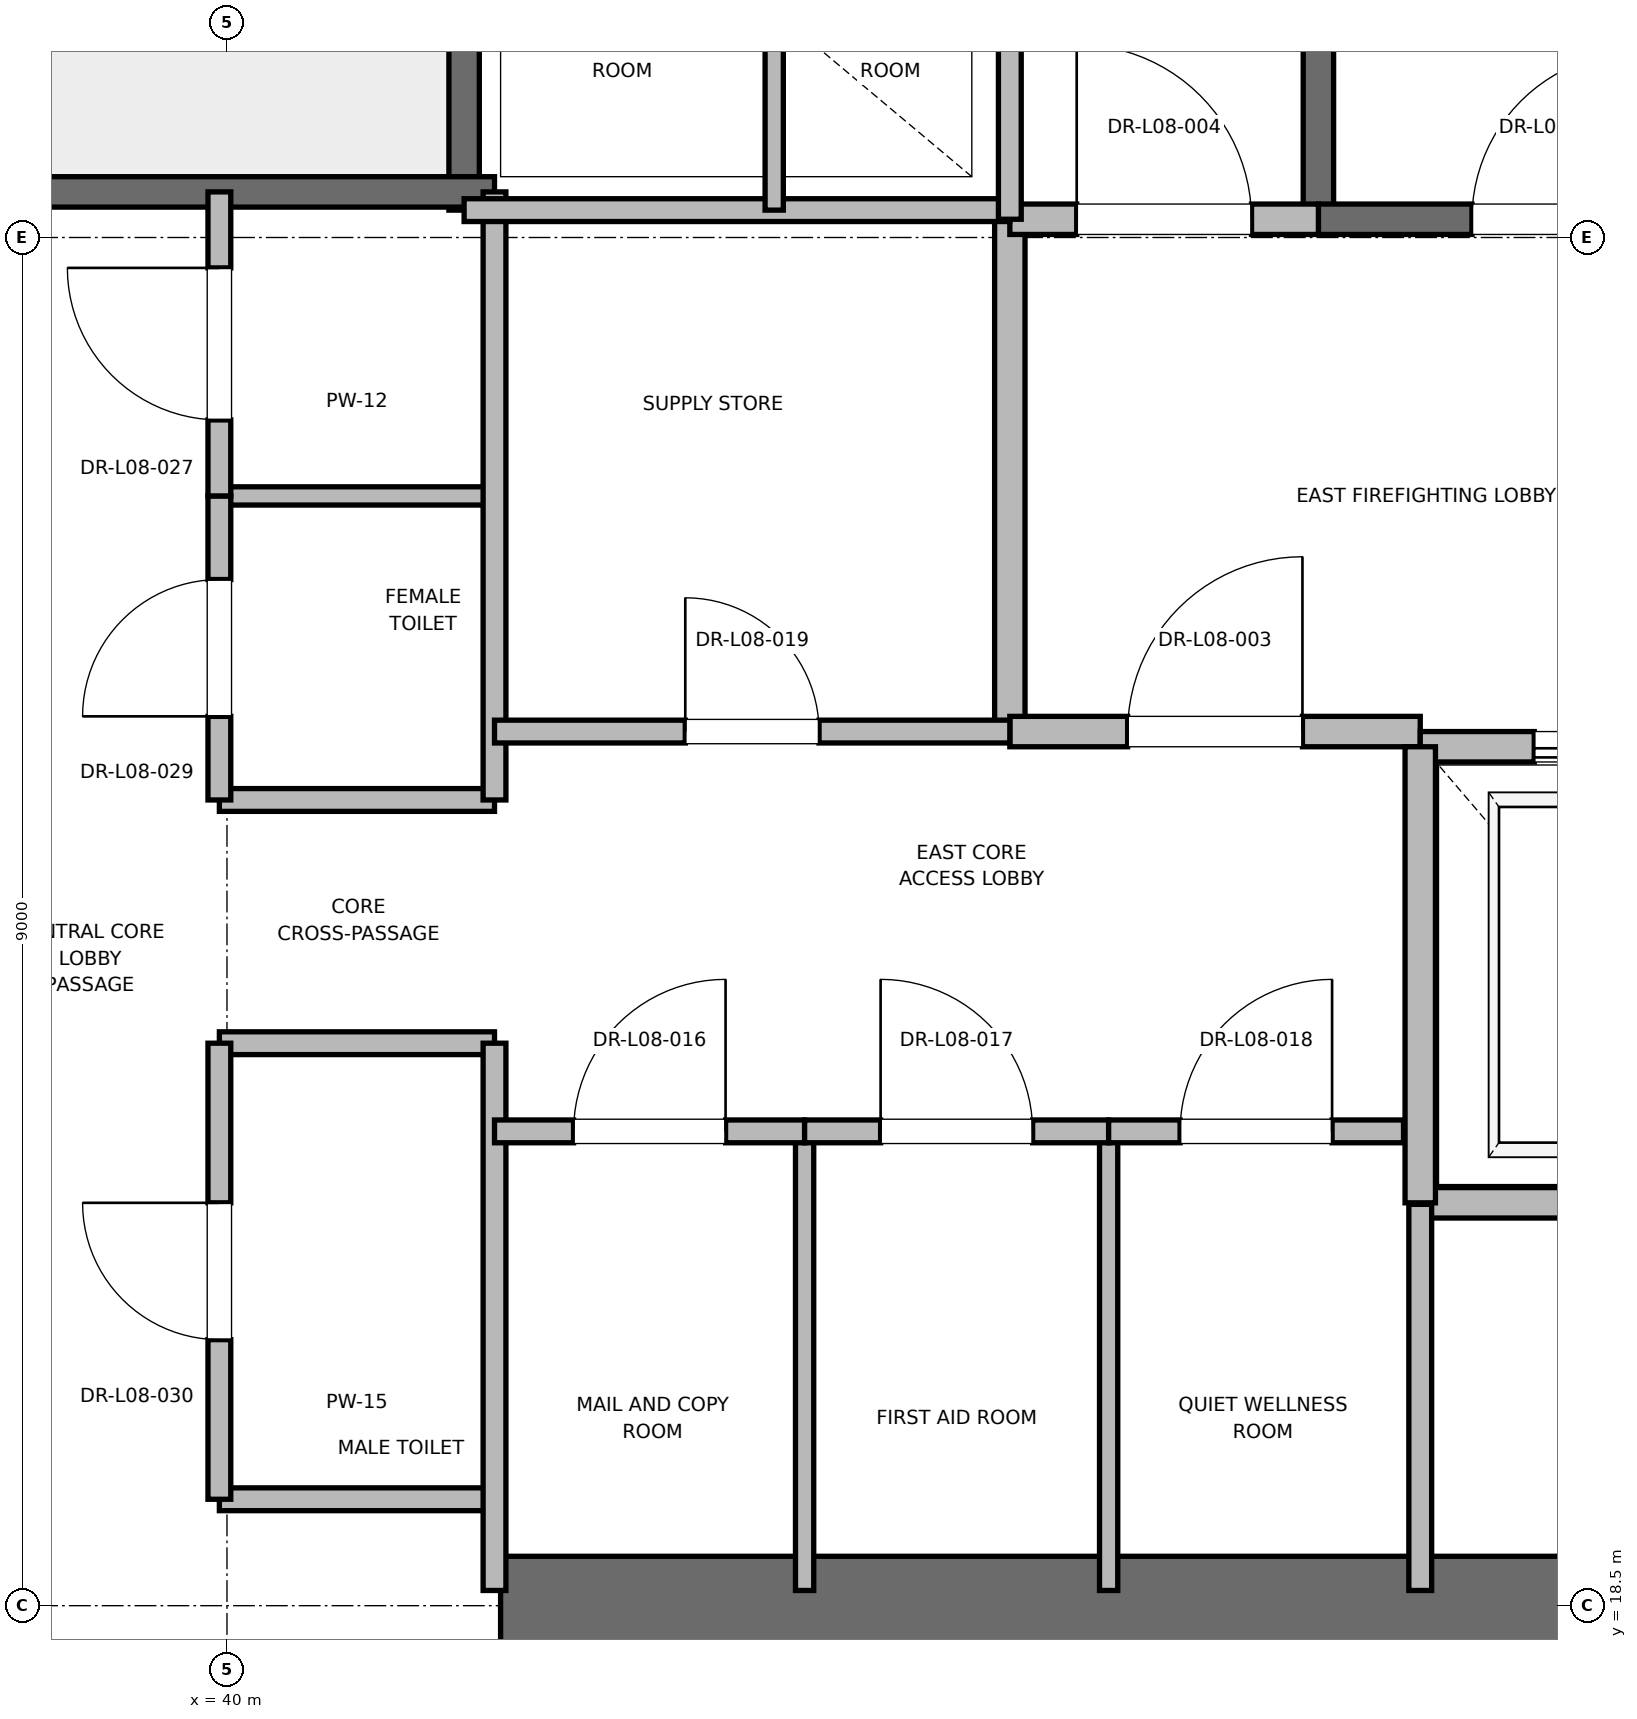
"""IFC4 building model, lengths in metres.
Left out: names, types, materials, properties, quantities, classifications, styles, units other than length and angle.
Written with IfcOpenShell. Run it as: python <this file> out.ifc"""

import sys

from ifc_helpers import new_model, si_unit, direction, frame, frame_2d, origin, place, context, subcontext, project, spatial, rectangle, extrude, element, fill, save


model = new_model("IFC4")
c1 = context("Model", 3, precision=1e-05, world=origin(), true_north=direction((0.0, 1.0)))
c2 = subcontext(c1, "Body", "Model", "MODEL_VIEW")
j1 = project(units=[si_unit("LENGTHUNIT", "METRE"), si_unit("PLANEANGLEUNIT", "RADIAN")], contexts=[c1])
p1 = place(None, origin())
s1 = spatial("IfcSite", under=j1, at=p1, CompositionType="ELEMENT")
p2 = place(p1, origin())
s2 = spatial("IfcBuilding", under=s1, at=p2, CompositionType="ELEMENT")
p3 = place(p2, frame((0.0, 0.0, 39.6)))
s3 = spatial("IfcBuildingStorey", under=s2, at=p3, CompositionType="ELEMENT", Elevation=39.6)
p4 = place(p3, frame((41.8, 18.5, 0.0), z_axis=(0.0, 0.0, 1.0), x_axis=(1.0, 0.0, 0.0)))
e1 = element("IfcWall", 1, at=p4, inside=s3, PredefinedType="SHEAR", context=c2, shape_type="SweptSolid", body=[
    extrude(rectangle(XDim=9.2, YDim=0.65, at=frame_2d((4.6, 0.0))), origin(), (0.0, 0.0, 1.0), 3.76),
])
p5 = place(p3, frame((47.18, 27.62, 0.0), z_axis=(0.0, 0.0, 1.0), x_axis=(0.0, 1.0, 0.0)))
e2 = element("IfcWall", 2, at=p5, inside=s3, PredefinedType="SOLIDWALL", context=c2, shape_type="SweptSolid", body=[
    extrude(rectangle(XDim=8.18, YDim=0.2, at=frame_2d((4.09, 0.0))), origin(), (0.0, 0.0, 1.0), 3.76),
])
p6 = place(p3, frame((47.18, 27.62, 0.0), z_axis=(0.0, 0.0, 1.0), x_axis=(1.0, 0.0, 0.0)))
e3 = element("IfcWall", 3, at=p6, inside=s3, PredefinedType="SOLIDWALL", context=c2, shape_type="SweptSolid", body=[
    extrude(rectangle(XDim=3.12, YDim=0.2, at=frame_2d((1.56, 0.0))), origin(), (0.0, 0.0, 1.0), 3.76),
])
p7 = place(p6, frame((1.01, 0.0, 0.0)))
e4 = element("IfcOpeningElement", 4, at=p7, cuts=e3, PredefinedType="OPENING", context=c2, shape_type="SweptSolid", body=[
    extrude(rectangle(XDim=1.1, YDim=2.15, at=frame_2d((0.55, 1.075))), frame((0.0, 0.1, 0.0), z_axis=(0.0, -1.0, 0.0), x_axis=(1.0, 0.0, 0.0)), (0.0, 0.0, 1.0), 0.2),
])
p8 = place(p3, frame((41.56, 27.68, 0.0), z_axis=(0.0, 0.0, 1.0), x_axis=(0.0, 1.0, 0.0)))
e5 = element("IfcWall", 5, at=p8, inside=s3, PredefinedType="SOLIDWALL", context=c2, shape_type="SweptSolid", body=[
    extrude(rectangle(XDim=8.57, YDim=0.2, at=frame_2d((4.285, 0.0))), origin(), (0.0, 0.0, 1.0), 3.76),
])
p9 = place(p3, frame((38.44, 27.8, 0.0), z_axis=(0.0, 0.0, 1.0), x_axis=(1.0, 0.0, 0.0)))
e6 = element("IfcWall", 6, at=p9, inside=s3, PredefinedType="SOLIDWALL", context=c2, shape_type="SweptSolid", body=[
    extrude(rectangle(XDim=3.32, YDim=0.2, at=frame_2d((1.66, 0.0))), origin(), (0.0, 0.0, 1.0), 3.76),
])
p10 = place(p3, frame((45.15, 24.25, 0.0), z_axis=(0.0, 0.0, 1.0), x_axis=(0.0, 1.0, 0.0)))
e7 = element("IfcWall", 7, at=p10, inside=s3, PredefinedType="PARTITIONING", context=c2, shape_type="SweptSolid", body=[
    extrude(rectangle(XDim=3.37, YDim=0.2, at=frame_2d((1.685, 0.0))), origin(), (0.0, 0.0, 1.0), 3.76),
])
p11 = place(p3, frame((45.15, 24.25, 0.0), z_axis=(0.0, 0.0, 1.0), x_axis=(1.0, 0.0, 0.0)))
e8 = element("IfcWall", 8, at=p11, inside=s3, PredefinedType="PARTITIONING", context=c2, shape_type="SweptSolid", body=[
    extrude(rectangle(XDim=2.7, YDim=0.2, at=frame_2d((1.35, 0.0))), origin(), (0.0, 0.0, 1.0), 3.76),
])
p12 = place(p11, frame((0.775, 0.0, 0.0)))
e9 = element("IfcOpeningElement", 9, at=p12, cuts=e8, PredefinedType="OPENING", context=c2, shape_type="SweptSolid", body=[
    extrude(rectangle(XDim=1.15, YDim=2.2, at=frame_2d((0.575, 1.1))), frame((0.0, 0.1, 0.0), z_axis=(0.0, -1.0, 0.0), x_axis=(1.0, 0.0, 0.0)), (0.0, 0.0, 1.0), 0.2),
])
p13 = place(p3, frame((45.15, 27.62, 0.0), z_axis=(0.0, 0.0, 1.0), x_axis=(1.0, 0.0, 0.0)))
e10 = element("IfcWall", 10, at=p13, inside=s3, PredefinedType="PARTITIONING", context=c2, shape_type="SweptSolid", body=[
    extrude(rectangle(XDim=2.03, YDim=0.2, at=frame_2d((1.015, 0.0))), origin(), (0.0, 0.0, 1.0), 3.76),
])
p14 = place(p13, frame((0.44, 0.0, 0.0)))
e11 = element("IfcOpeningElement", 11, at=p14, cuts=e10, PredefinedType="OPENING", context=c2, shape_type="SweptSolid", body=[
    extrude(rectangle(XDim=1.15, YDim=2.2, at=frame_2d((0.575, 1.1))), frame((0.0, 0.1, 0.0), z_axis=(0.0, -1.0, 0.0), x_axis=(1.0, 0.0, 0.0)), (0.0, 0.0, 1.0), 0.2),
])
p15 = place(p3, frame((47.85, 21.15, 0.0), z_axis=(0.0, 0.0, 1.0), x_axis=(1.0, 0.0, 0.0)))
e12 = element("IfcWall", 12, at=p15, inside=s3, PredefinedType="SOLIDWALL", context=c2, shape_type="SweptSolid", body=[
    extrude(rectangle(XDim=2.6, YDim=0.2, at=frame_2d((1.3, 0.0))), origin(), (0.0, 0.0, 1.0), 3.76),
])
p16 = place(p3, frame((50.45, 24.15, 0.0), z_axis=(0.0, 0.0, 1.0), x_axis=(-1.0, 0.0, 0.0)))
e13 = element("IfcWall", 13, at=p16, inside=s3, PredefinedType="SOLIDWALL", context=c2, shape_type="SweptSolid", body=[
    extrude(rectangle(XDim=2.6, YDim=0.2, at=frame_2d((1.3, 0.0))), origin(), (0.0, 0.0, 1.0), 2.54),
])
p17 = place(p16, frame((0.75, 0.0, 0.0)))
e14 = element("IfcOpeningElement", 14, at=p17, cuts=e13, PredefinedType="OPENING", context=c2, shape_type="SweptSolid", body=[
    extrude(rectangle(XDim=1.1, YDim=2.2, at=frame_2d((0.55, 1.1))), frame((0.0, 0.1, 0.0), z_axis=(0.0, -1.0, 0.0), x_axis=(1.0, 0.0, 0.0)), (0.0, 0.0, 1.0), 0.2),
])
p18 = place(p3, frame((47.85, 24.15, 0.0), z_axis=(0.0, 0.0, 1.0), x_axis=(0.0, -1.0, 0.0)))
e15 = element("IfcWall", 15, at=p18, inside=s3, PredefinedType="SOLIDWALL", context=c2, shape_type="SweptSolid", body=[
    extrude(rectangle(XDim=3.0, YDim=0.2, at=frame_2d((1.5, 0.0))), origin(), (0.0, 0.0, 1.0), 3.76),
])
for number, where, z_axis, x_axis in (
    (16, (39.95, 19.2, 0.0), (0.0, 0.0, 1.0), (1.0, 0.0, 0.0)),
    (17, (39.95, 22.2, 0.0), (0.0, 0.0, 1.0), (1.0, 0.0, 0.0)),
    (18, (39.95, 23.8, 0.0), (0.0, 0.0, 1.0), (1.0, 0.0, 0.0)),
):
    element("IfcWall", number, at=place(p3, frame(where, z_axis=z_axis, x_axis=x_axis)), inside=s3, PredefinedType="PARTITIONING", context=c2, shape_type="SweptSolid", body=[
        extrude(rectangle(XDim=1.81, YDim=0.15, at=frame_2d((0.905, 0.0))), origin(), (0.0, 0.0, 1.0), 2.85),
    ])
p19 = place(p3, frame((39.95, 25.8, 0.0), z_axis=(0.0, 0.0, 1.0), x_axis=(1.0, 0.0, 0.0)))
e19 = element("IfcWall", 19, at=p19, inside=s3, PredefinedType="PARTITIONING", context=c2, shape_type="SweptSolid", body=[
    extrude(rectangle(XDim=1.81, YDim=0.12, at=frame_2d((0.905, 0.0))), origin(), (0.0, 0.0, 1.0), 2.85),
])
p20 = place(p3, frame((41.76, 18.6, 0.0), z_axis=(0.0, 0.0, 1.0), x_axis=(0.0, 1.0, 0.0)))
e20 = element("IfcWall", 20, at=p20, inside=s3, PredefinedType="PARTITIONING", context=c2, shape_type="SweptSolid", body=[
    extrude(rectangle(XDim=3.6, YDim=0.15, at=frame_2d((1.8, 0.0))), origin(), (0.0, 0.0, 1.0), 2.54),
])
p21 = place(p3, frame((41.76, 23.8, 0.0), z_axis=(0.0, 0.0, 1.0), x_axis=(0.0, 1.0, 0.0)))
e21 = element("IfcWall", 21, at=p21, inside=s3, PredefinedType="PARTITIONING", context=c2, shape_type="SweptSolid", body=[
    extrude(rectangle(XDim=4.0, YDim=0.15, at=frame_2d((2.0, 0.0))), origin(), (0.0, 0.0, 1.0), 2.85),
])
p22 = place(p3, frame((39.95, 19.2, 0.0), z_axis=(0.0, 0.0, 1.0), x_axis=(0.0, 1.0, 0.0)))
e22 = element("IfcWall", 22, at=p22, inside=s3, PredefinedType="PARTITIONING", context=c2, shape_type="SweptSolid", body=[
    extrude(rectangle(XDim=3.0, YDim=0.15, at=frame_2d((1.5, 0.0))), origin(), (0.0, 0.0, 1.0), 2.85),
])
p23 = place(p22, frame((1.05, 0.0, 0.0)))
e23 = element("IfcOpeningElement", 23, at=p23, cuts=e22, PredefinedType="OPENING", context=c2, shape_type="SweptSolid", body=[
    extrude(rectangle(XDim=0.9, YDim=2.1, at=frame_2d((0.45, 1.05))), frame((0.0, 0.075, 0.0), z_axis=(0.0, -1.0, 0.0), x_axis=(1.0, 0.0, 0.0)), (0.0, 0.0, 1.0), 0.15),
])
p24 = place(p3, frame((39.95, 23.8, 0.0), z_axis=(0.0, 0.0, 1.0), x_axis=(0.0, 1.0, 0.0)))
e24 = element("IfcWall", 24, at=p24, inside=s3, PredefinedType="PARTITIONING", context=c2, shape_type="SweptSolid", body=[
    extrude(rectangle(XDim=2.0, YDim=0.15, at=frame_2d((1.0, 0.0))), origin(), (0.0, 0.0, 1.0), 2.85),
])
p25 = place(p24, frame((0.55, 0.0, 0.0)))
e25 = element("IfcOpeningElement", 25, at=p25, cuts=e24, PredefinedType="OPENING", context=c2, shape_type="SweptSolid", body=[
    extrude(rectangle(XDim=0.9, YDim=2.1, at=frame_2d((0.45, 1.05))), frame((0.0, 0.075, 0.0), z_axis=(0.0, -1.0, 0.0), x_axis=(1.0, 0.0, 0.0)), (0.0, 0.0, 1.0), 0.15),
])
p26 = place(p3, frame((39.95, 25.8, 0.0), z_axis=(0.0, 0.0, 1.0), x_axis=(0.0, 1.0, 0.0)))
e26 = element("IfcWall", 26, at=p26, inside=s3, PredefinedType="PARTITIONING", context=c2, shape_type="SweptSolid", body=[
    extrude(rectangle(XDim=2.0, YDim=0.15, at=frame_2d((1.0, 0.0))), origin(), (0.0, 0.0, 1.0), 2.85),
])
p27 = place(p26, frame((0.5, 0.0, 0.0)))
e27 = element("IfcOpeningElement", 27, at=p27, cuts=e26, PredefinedType="OPENING", context=c2, shape_type="SweptSolid", body=[
    extrude(rectangle(XDim=1.0, YDim=2.15, at=frame_2d((0.5, 1.075))), frame((0.0, 0.075, 0.0), z_axis=(0.0, -1.0, 0.0), x_axis=(1.0, 0.0, 0.0)), (0.0, 0.0, 1.0), 0.15),
])
p28 = place(p3, frame((41.56, 27.68, 0.0), z_axis=(0.0, 0.0, 1.0), x_axis=(1.0, 0.0, 0.0)))
e28 = element("IfcWall", 28, at=p28, inside=s3, PredefinedType="PARTITIONING", context=c2, shape_type="SweptSolid", body=[
    extrude(rectangle(XDim=3.59, YDim=0.15, at=frame_2d((1.795, 0.0))), origin(), (0.0, 0.0, 1.0), 2.85),
])
p29 = place(p3, frame((47.85, 18.6, 0.0), z_axis=(0.0, 0.0, 1.0), x_axis=(0.0, 1.0, 0.0)))
e29 = element("IfcWall", 29, at=p29, inside=s3, PredefinedType="PARTITIONING", context=c2, shape_type="SweptSolid", body=[
    extrude(rectangle(XDim=2.54, YDim=0.15, at=frame_2d((1.27, 0.0))), origin(), (0.0, 0.0, 1.0), 2.85),
])
for number, where, z_axis, x_axis in (
    (30, (43.8, 18.6, 0.0), (0.0, 0.0, 1.0), (0.0, 1.0, 0.0)),
    (31, (45.8, 18.6, 0.0), (0.0, 0.0, 1.0), (0.0, 1.0, 0.0)),
):
    element("IfcWall", number, at=place(p3, frame(where, z_axis=z_axis, x_axis=x_axis)), inside=s3, PredefinedType="PARTITIONING", context=c2, shape_type="SweptSolid", body=[
        extrude(rectangle(XDim=3.02, YDim=0.12, at=frame_2d((1.51, 0.0))), origin(), (0.0, 0.0, 1.0), 2.85),
    ])
p30 = place(p3, frame((41.76, 21.62, 0.0), z_axis=(0.0, 0.0, 1.0), x_axis=(1.0, 0.0, 0.0)))
e32 = element("IfcWall", 32, at=p30, inside=s3, PredefinedType="PARTITIONING", context=c2, shape_type="SweptSolid", body=[
    extrude(rectangle(XDim=2.04, YDim=0.15, at=frame_2d((1.02, 0.0))), origin(), (0.0, 0.0, 1.0), 2.85),
])
p31 = place(p30, frame((0.52, 0.0, 0.0)))
e33 = element("IfcOpeningElement", 33, at=p31, cuts=e32, PredefinedType="OPENING", context=c2, shape_type="SweptSolid", body=[
    extrude(rectangle(XDim=1.0, YDim=2.15, at=frame_2d((0.5, 1.075))), frame((0.0, 0.075, 0.0), z_axis=(0.0, -1.0, 0.0), x_axis=(1.0, 0.0, 0.0)), (0.0, 0.0, 1.0), 0.15),
])
p32 = place(p3, frame((43.8, 21.62, 0.0), z_axis=(0.0, 0.0, 1.0), x_axis=(1.0, 0.0, 0.0)))
e34 = element("IfcWall", 34, at=p32, inside=s3, PredefinedType="PARTITIONING", context=c2, shape_type="SweptSolid", body=[
    extrude(rectangle(XDim=2.0, YDim=0.15, at=frame_2d((1.0, 0.0))), origin(), (0.0, 0.0, 1.0), 2.85),
])
p33 = place(p32, frame((0.5, 0.0, 0.0)))
e35 = element("IfcOpeningElement", 35, at=p33, cuts=e34, PredefinedType="OPENING", context=c2, shape_type="SweptSolid", body=[
    extrude(rectangle(XDim=1.0, YDim=2.15, at=frame_2d((0.5, 1.075))), frame((0.0, 0.075, 0.0), z_axis=(0.0, -1.0, 0.0), x_axis=(1.0, 0.0, 0.0)), (0.0, 0.0, 1.0), 0.15),
])
p34 = place(p3, frame((45.8, 21.62, 0.0), z_axis=(0.0, 0.0, 1.0), x_axis=(1.0, 0.0, 0.0)))
e36 = element("IfcWall", 36, at=p34, inside=s3, PredefinedType="PARTITIONING", context=c2, shape_type="SweptSolid", body=[
    extrude(rectangle(XDim=1.94, YDim=0.15, at=frame_2d((0.97, 0.0))), origin(), (0.0, 0.0, 1.0), 2.85),
])
p35 = place(p34, frame((0.47, 0.0, 0.0)))
e37 = element("IfcOpeningElement", 37, at=p35, cuts=e36, PredefinedType="OPENING", context=c2, shape_type="SweptSolid", body=[
    extrude(rectangle(XDim=1.0, YDim=2.15, at=frame_2d((0.5, 1.075))), frame((0.0, 0.075, 0.0), z_axis=(0.0, -1.0, 0.0), x_axis=(1.0, 0.0, 0.0)), (0.0, 0.0, 1.0), 0.15),
])
p36 = place(p3, frame((41.76, 24.25, 0.0), z_axis=(0.0, 0.0, 1.0), x_axis=(1.0, 0.0, 0.0)))
e38 = element("IfcWall", 38, at=p36, inside=s3, PredefinedType="PARTITIONING", context=c2, shape_type="SweptSolid", body=[
    extrude(rectangle(XDim=3.39, YDim=0.15, at=frame_2d((1.695, 0.0))), origin(), (0.0, 0.0, 1.0), 2.85),
])
p37 = place(p36, frame((1.255, 0.0, 0.0)))
e39 = element("IfcOpeningElement", 39, at=p37, cuts=e38, PredefinedType="OPENING", context=c2, shape_type="SweptSolid", body=[
    extrude(rectangle(XDim=0.88, YDim=2.1, at=frame_2d((0.44, 1.05))), frame((0.0, 0.075, 0.0), z_axis=(0.0, -1.0, 0.0), x_axis=(1.0, 0.0, 0.0)), (0.0, 0.0, 1.0), 0.15),
])
p38 = place(p3, frame((45.15, 27.62, 0.0), z_axis=(0.0, 0.0, 1.0), x_axis=(0.0, 1.0, 0.0)))
e40 = element("IfcWall", 40, at=p38, inside=s3, PredefinedType="PARTITIONING", context=c2, shape_type="SweptSolid", body=[
    extrude(rectangle(XDim=3.1, YDim=0.15, at=frame_2d((1.55, 0.0))), origin(), (0.0, 0.0, 1.0), 2.85),
])
p39 = place(p3, frame((43.6, 27.68, 0.0), z_axis=(0.0, 0.0, 1.0), x_axis=(0.0, 1.0, 0.0)))
e41 = element("IfcWall", 41, at=p39, inside=s3, PredefinedType="PARTITIONING", context=c2, shape_type="SweptSolid", body=[
    extrude(rectangle(XDim=3.04, YDim=0.12, at=frame_2d((1.52, 0.0))), origin(), (0.0, 0.0, 1.0), 2.85),
])
p40 = place(p7, origin())
e42 = element("IfcDoor", 42, at=p40, inside=s3, OperationType="SINGLE_SWING_RIGHT", PredefinedType="DOOR", context=c2, shape_type="SweptSolid", body=[
    extrude(rectangle(XDim=1.1, YDim=2.15, at=frame_2d((0.55, 1.075))), frame((0.0, 0.025, 0.0), z_axis=(0.0, -1.0, 0.0), x_axis=(1.0, 0.0, 0.0)), (0.0, 0.0, 1.0), 0.05),
])
fill(e4, e42)
p41 = place(p12, origin())
e43 = element("IfcDoor", 43, at=p41, inside=s3, OperationType="SINGLE_SWING_RIGHT", PredefinedType="DOOR", context=c2, shape_type="SweptSolid", body=[
    extrude(rectangle(XDim=1.15, YDim=2.2, at=frame_2d((0.575, 1.1))), frame((0.0, 0.025, 0.0), z_axis=(0.0, -1.0, 0.0), x_axis=(1.0, 0.0, 0.0)), (0.0, 0.0, 1.0), 0.05),
])
fill(e9, e43)
p42 = place(p14, origin())
e44 = element("IfcDoor", 44, at=p42, inside=s3, OperationType="SINGLE_SWING_LEFT", PredefinedType="DOOR", context=c2, shape_type="SweptSolid", body=[
    extrude(rectangle(XDim=1.15, YDim=2.2, at=frame_2d((0.575, 1.1))), frame((0.0, 0.025, 0.0), z_axis=(0.0, -1.0, 0.0), x_axis=(1.0, 0.0, 0.0)), (0.0, 0.0, 1.0), 0.05),
])
fill(e11, e44)
p43 = place(p17, origin())
e45 = element("IfcDoor", 45, at=p43, inside=s3, OperationType="SLIDING_TO_RIGHT", PredefinedType="DOOR", context=c2, shape_type="SweptSolid", body=[
    extrude(rectangle(XDim=1.1, YDim=2.2, at=frame_2d((0.55, 1.1))), frame((0.0, 0.025, 0.0), z_axis=(0.0, -1.0, 0.0), x_axis=(1.0, 0.0, 0.0)), (0.0, 0.0, 1.0), 0.05),
])
fill(e14, e45)
p44 = place(p23, origin())
e46 = element("IfcDoor", 46, at=p44, inside=s3, OperationType="SINGLE_SWING_RIGHT", PredefinedType="DOOR", context=c2, shape_type="SweptSolid", body=[
    extrude(rectangle(XDim=0.9, YDim=2.1, at=frame_2d((0.45, 1.05))), frame((0.0, 0.025, 0.0), z_axis=(0.0, -1.0, 0.0), x_axis=(1.0, 0.0, 0.0)), (0.0, 0.0, 1.0), 0.05),
])
fill(e23, e46)
p45 = place(p25, origin())
e47 = element("IfcDoor", 47, at=p45, inside=s3, OperationType="SINGLE_SWING_LEFT", PredefinedType="DOOR", context=c2, shape_type="SweptSolid", body=[
    extrude(rectangle(XDim=0.9, YDim=2.1, at=frame_2d((0.45, 1.05))), frame((0.0, 0.025, 0.0), z_axis=(0.0, -1.0, 0.0), x_axis=(1.0, 0.0, 0.0)), (0.0, 0.0, 1.0), 0.05),
])
fill(e25, e47)
p46 = place(p27, origin())
e48 = element("IfcDoor", 48, at=p46, inside=s3, OperationType="SINGLE_SWING_RIGHT", PredefinedType="DOOR", context=c2, shape_type="SweptSolid", body=[
    extrude(rectangle(XDim=1.0, YDim=2.15, at=frame_2d((0.5, 1.075))), frame((0.0, 0.025, 0.0), z_axis=(0.0, -1.0, 0.0), x_axis=(1.0, 0.0, 0.0)), (0.0, 0.0, 1.0), 0.05),
])
fill(e27, e48)
p47 = place(p31, origin())
e49 = element("IfcDoor", 49, at=p47, inside=s3, OperationType="SINGLE_SWING_RIGHT", PredefinedType="DOOR", context=c2, shape_type="SweptSolid", body=[
    extrude(rectangle(XDim=1.0, YDim=2.15, at=frame_2d((0.5, 1.075))), frame((0.0, 0.025, 0.0), z_axis=(0.0, -1.0, 0.0), x_axis=(1.0, 0.0, 0.0)), (0.0, 0.0, 1.0), 0.05),
])
fill(e33, e49)
p48 = place(p33, origin())
e50 = element("IfcDoor", 50, at=p48, inside=s3, OperationType="SINGLE_SWING_LEFT", PredefinedType="DOOR", context=c2, shape_type="SweptSolid", body=[
    extrude(rectangle(XDim=1.0, YDim=2.15, at=frame_2d((0.5, 1.075))), frame((0.0, 0.025, 0.0), z_axis=(0.0, -1.0, 0.0), x_axis=(1.0, 0.0, 0.0)), (0.0, 0.0, 1.0), 0.05),
])
fill(e35, e50)
p49 = place(p35, origin())
e51 = element("IfcDoor", 51, at=p49, inside=s3, OperationType="SINGLE_SWING_RIGHT", PredefinedType="DOOR", context=c2, shape_type="SweptSolid", body=[
    extrude(rectangle(XDim=1.0, YDim=2.15, at=frame_2d((0.5, 1.075))), frame((0.0, 0.025, 0.0), z_axis=(0.0, -1.0, 0.0), x_axis=(1.0, 0.0, 0.0)), (0.0, 0.0, 1.0), 0.05),
])
fill(e37, e51)
p50 = place(p37, origin())
e52 = element("IfcDoor", 52, at=p50, inside=s3, OperationType="SINGLE_SWING_LEFT", PredefinedType="DOOR", context=c2, shape_type="SweptSolid", body=[
    extrude(rectangle(XDim=0.88, YDim=2.1, at=frame_2d((0.44, 1.05))), frame((0.0, 0.025, 0.0), z_axis=(0.0, -1.0, 0.0), x_axis=(1.0, 0.0, 0.0)), (0.0, 0.0, 1.0), 0.05),
])
fill(e39, e52)
save(model, sys.argv[1])
